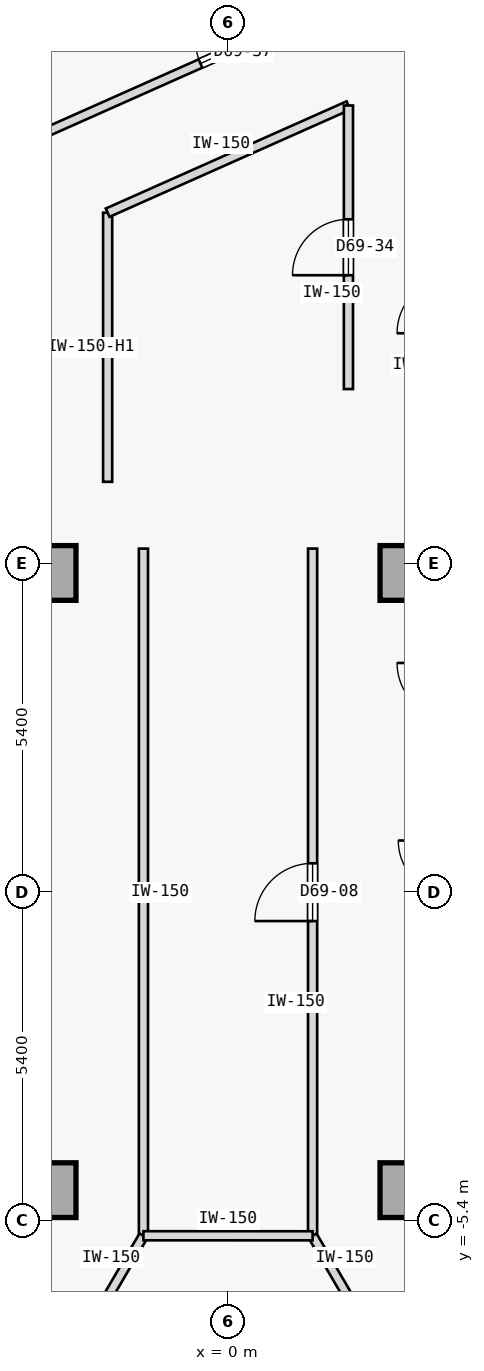
"""IFC4 building model, lengths in metres.
Left out: names, types, materials, properties, quantities, classifications, styles, units other than length and angle.
Written with IfcOpenShell. Run it as: python <this file> out.ifc"""

import sys

from ifc_helpers import new_model, si_unit, direction, frame, frame_2d, origin, origin_2d, place, context, subcontext, project, spatial, rectangle, extrude, element, fill, save


model = new_model("IFC4")
c1 = context("Model", 3, precision=1e-05, world=origin(), true_north=direction((0.0, 1.0)))
c2 = subcontext(c1, "Body", "Model", "MODEL_VIEW")
j1 = project(units=[si_unit("LENGTHUNIT", "METRE"), si_unit("PLANEANGLEUNIT", "RADIAN")], contexts=[c1])
p1 = place(None, origin())
s1 = spatial("IfcSite", under=j1, at=p1, CompositionType="ELEMENT")
p2 = place(p1, origin())
s2 = spatial("IfcBuilding", under=s1, at=p2, CompositionType="ELEMENT")
p3 = place(p2, frame((0.0, 0.0, 258.85)))
s3 = spatial("IfcBuildingStorey", under=s2, at=p3, CompositionType="ELEMENT", Elevation=258.85)
for number, where, z_axis, x_axis in (
    (1, (-2.95, -4.9, 0.0), (0.0, 0.0, 1.0), (1.0, 0.0, 0.0)),
    (2, (-2.95, 5.25, 0.0), (0.0, 0.0, 1.0), (1.0, 0.0, 0.0)),
    (3, (2.95, -4.9, 0.0), (0.0, 0.0, 1.0), (1.0, 0.0, 0.0)),
    (4, (2.95, 5.25, 0.0), (0.0, 0.0, 1.0), (1.0, 0.0, 0.0)),
):
    element("IfcColumn", number, at=place(p3, frame(where, z_axis=z_axis, x_axis=x_axis)), inside=s3, PredefinedType="COLUMN", context=c2, shape_type="SweptSolid", body=[
        extrude(rectangle(XDim=0.9, YDim=0.9, at=origin_2d()), origin(), (0.0, 0.0, 1.0), 3.35),
    ])
p4 = place(p3, frame((-1.391, -5.65, 0.0), z_axis=(0.0, 0.0, 1.0), x_axis=(-2.1605738e-05, 0.999999999767, 0.0)))
e5 = element("IfcWall", 5, at=p4, inside=s3, PredefinedType="PARTITIONING", context=c2, shape_type="SweptSolid", body=[
    extrude(rectangle(XDim=11.3, YDim=0.15, at=frame_2d((5.65, 0.0))), origin(), (0.0, 0.0, 1.0), 3.125),
])
p5 = place(p3, frame((1.391, -5.65, 0.0), z_axis=(0.0, 0.0, 1.0), x_axis=(4.3206809e-05, 0.999999999067, 0.0)))
e6 = element("IfcWall", 6, at=p5, inside=s3, PredefinedType="PARTITIONING", context=c2, shape_type="SweptSolid", body=[
    extrude(rectangle(XDim=11.301, YDim=0.15, at=frame_2d((5.65, 0.0))), origin(), (0.0, 0.0, 1.0), 3.125),
])
p6 = place(p5, frame((5.176, 0.0, 0.0)))
e7 = element("IfcOpeningElement", 7, at=p6, cuts=e6, PredefinedType="OPENING", context=c2, shape_type="SweptSolid", body=[
    extrude(rectangle(XDim=0.95, YDim=2.15, at=frame_2d((0.475, 1.075))), frame((0.0, 0.085, 0.0), z_axis=(0.0, -1.0, 0.0), x_axis=(1.0, 0.0, 0.0)), (0.0, 0.0, 1.0), 0.17),
])
p7 = place(p3, frame((-1.98, -6.658, 0.0), z_axis=(0.0, 0.0, 1.0), x_axis=(0.504651025514, 0.863323428645, 0.0)))
e8 = element("IfcWall", 8, at=p7, inside=s3, PredefinedType="PARTITIONING", context=c2, shape_type="SweptSolid", body=[
    extrude(rectangle(XDim=1.167, YDim=0.15, at=frame_2d((0.584, 0.0))), origin(), (0.0, 0.0, 1.0), 3.125),
])
p8 = place(p3, frame((1.391, -5.65, 0.0), z_axis=(0.0, 0.0, 1.0), x_axis=(0.504339173621, -0.863505644424, 0.0)))
e9 = element("IfcWall", 9, at=p8, inside=s3, PredefinedType="PARTITIONING", context=c2, shape_type="SweptSolid", body=[
    extrude(rectangle(XDim=1.167, YDim=0.15, at=frame_2d((0.583, 0.0))), origin(), (0.0, 0.0, 1.0), 3.125),
])
p9 = place(p3, frame((-1.98, 6.749, 0.0), z_axis=(0.0, 0.0, 1.0), x_axis=(0.0, 1.0, 0.0)))
e10 = element("IfcWall", 10, at=p9, inside=s3, PredefinedType="PARTITIONING", context=c2, shape_type="SweptSolid", body=[
    extrude(rectangle(XDim=4.426, YDim=0.15, at=frame_2d((2.213, 0.0))), origin(), (0.0, 0.0, 1.0), 2.675),
])
p10 = place(p3, frame((-1.98, 11.174, 0.0), z_axis=(0.0, 0.0, 1.0), x_axis=(0.913546598225, 0.406734081276, 0.0)))
e11 = element("IfcWall", 11, at=p10, inside=s3, PredefinedType="PARTITIONING", context=c2, shape_type="SweptSolid", body=[
    extrude(rectangle(XDim=4.335, YDim=0.15, at=frame_2d((2.167, 0.0))), origin(), (0.0, 0.0, 1.0), 3.125),
])
p11 = place(p3, frame((1.98, 8.274, 0.0), z_axis=(0.0, 0.0, 1.0), x_axis=(5.2356021e-05, 0.999999998629, 0.0)))
e12 = element("IfcWall", 12, at=p11, inside=s3, PredefinedType="PARTITIONING", context=c2, shape_type="SweptSolid", body=[
    extrude(rectangle(XDim=4.663, YDim=0.15, at=frame_2d((2.332, 0.0))), origin(), (0.0, 0.0, 1.0), 3.125),
])
p12 = place(p11, frame((1.872, 0.0, 0.0)))
e13 = element("IfcOpeningElement", 13, at=p12, cuts=e12, PredefinedType="OPENING", context=c2, shape_type="SweptSolid", body=[
    extrude(rectangle(XDim=0.92, YDim=2.15, at=frame_2d((0.46, 1.075))), frame((0.0, 0.085, 0.0), z_axis=(0.0, -1.0, 0.0), x_axis=(1.0, 0.0, 0.0)), (0.0, 0.0, 1.0), 0.17),
])
p13 = place(p3, frame((-9.109, 9.773, 0.0), z_axis=(0.0, 0.0, 1.0), x_axis=(0.913545361298, 0.406736859469, 0.0)))
e14 = element("IfcWall", 14, at=p13, inside=s3, PredefinedType="PARTITIONING", context=c2, shape_type="SweptSolid", body=[
    extrude(rectangle(XDim=19.871, YDim=0.15, at=frame_2d((9.936, 0.0))), origin(), (0.0, 0.0, 1.0), 3.125),
])
p14 = place(p13, frame((9.476, 0.0, 0.0)))
e15 = element("IfcOpeningElement", 15, at=p14, cuts=e14, PredefinedType="OPENING", context=c2, shape_type="SweptSolid", body=[
    extrude(rectangle(XDim=0.92, YDim=2.15, at=frame_2d((0.46, 1.075))), frame((0.0, 0.085, 0.0), z_axis=(0.0, -1.0, 0.0), x_axis=(1.0, 0.0, 0.0)), (0.0, 0.0, 1.0), 0.17),
])
p15 = place(p3, frame((-1.391, -5.65, 0.0), z_axis=(0.0, 0.0, 1.0), x_axis=(0.999999984594, -0.000175530979, 0.0)))
e16 = element("IfcWall", 16, at=p15, inside=s3, PredefinedType="PARTITIONING", context=c2, shape_type="SweptSolid", body=[
    extrude(rectangle(XDim=2.782, YDim=0.15, at=frame_2d((1.391, 0.0))), origin(), (0.0, 0.0, 1.0), 3.125),
])
p16 = place(p6, origin())
e17 = element("IfcDoor", 17, at=p16, inside=s3, OperationType="SINGLE_SWING_LEFT", PredefinedType="DOOR", context=c2, shape_type="SweptSolid", body=[
    extrude(rectangle(XDim=0.95, YDim=2.15, at=frame_2d((0.475, 1.075))), frame((0.0, 0.025, 0.0), z_axis=(0.0, -1.0, 0.0), x_axis=(1.0, 0.0, 0.0)), (0.0, 0.0, 1.0), 0.05),
])
fill(e7, e17)
p17 = place(p12, origin())
e18 = element("IfcDoor", 18, at=p17, inside=s3, OperationType="SINGLE_SWING_LEFT", PredefinedType="DOOR", context=c2, shape_type="SweptSolid", body=[
    extrude(rectangle(XDim=0.92, YDim=2.15, at=frame_2d((0.46, 1.075))), frame((0.0, 0.025, 0.0), z_axis=(0.0, -1.0, 0.0), x_axis=(1.0, 0.0, 0.0)), (0.0, 0.0, 1.0), 0.05),
])
fill(e13, e18)
p18 = place(p14, origin())
e19 = element("IfcDoor", 19, at=p18, inside=s3, OperationType="SINGLE_SWING_RIGHT", PredefinedType="DOOR", context=c2, shape_type="SweptSolid", body=[
    extrude(rectangle(XDim=0.92, YDim=2.15, at=frame_2d((0.46, 1.075))), frame((0.0, 0.025, 0.0), z_axis=(0.0, -1.0, 0.0), x_axis=(1.0, 0.0, 0.0)), (0.0, 0.0, 1.0), 0.05),
])
fill(e15, e19)
save(model, sys.argv[1])
